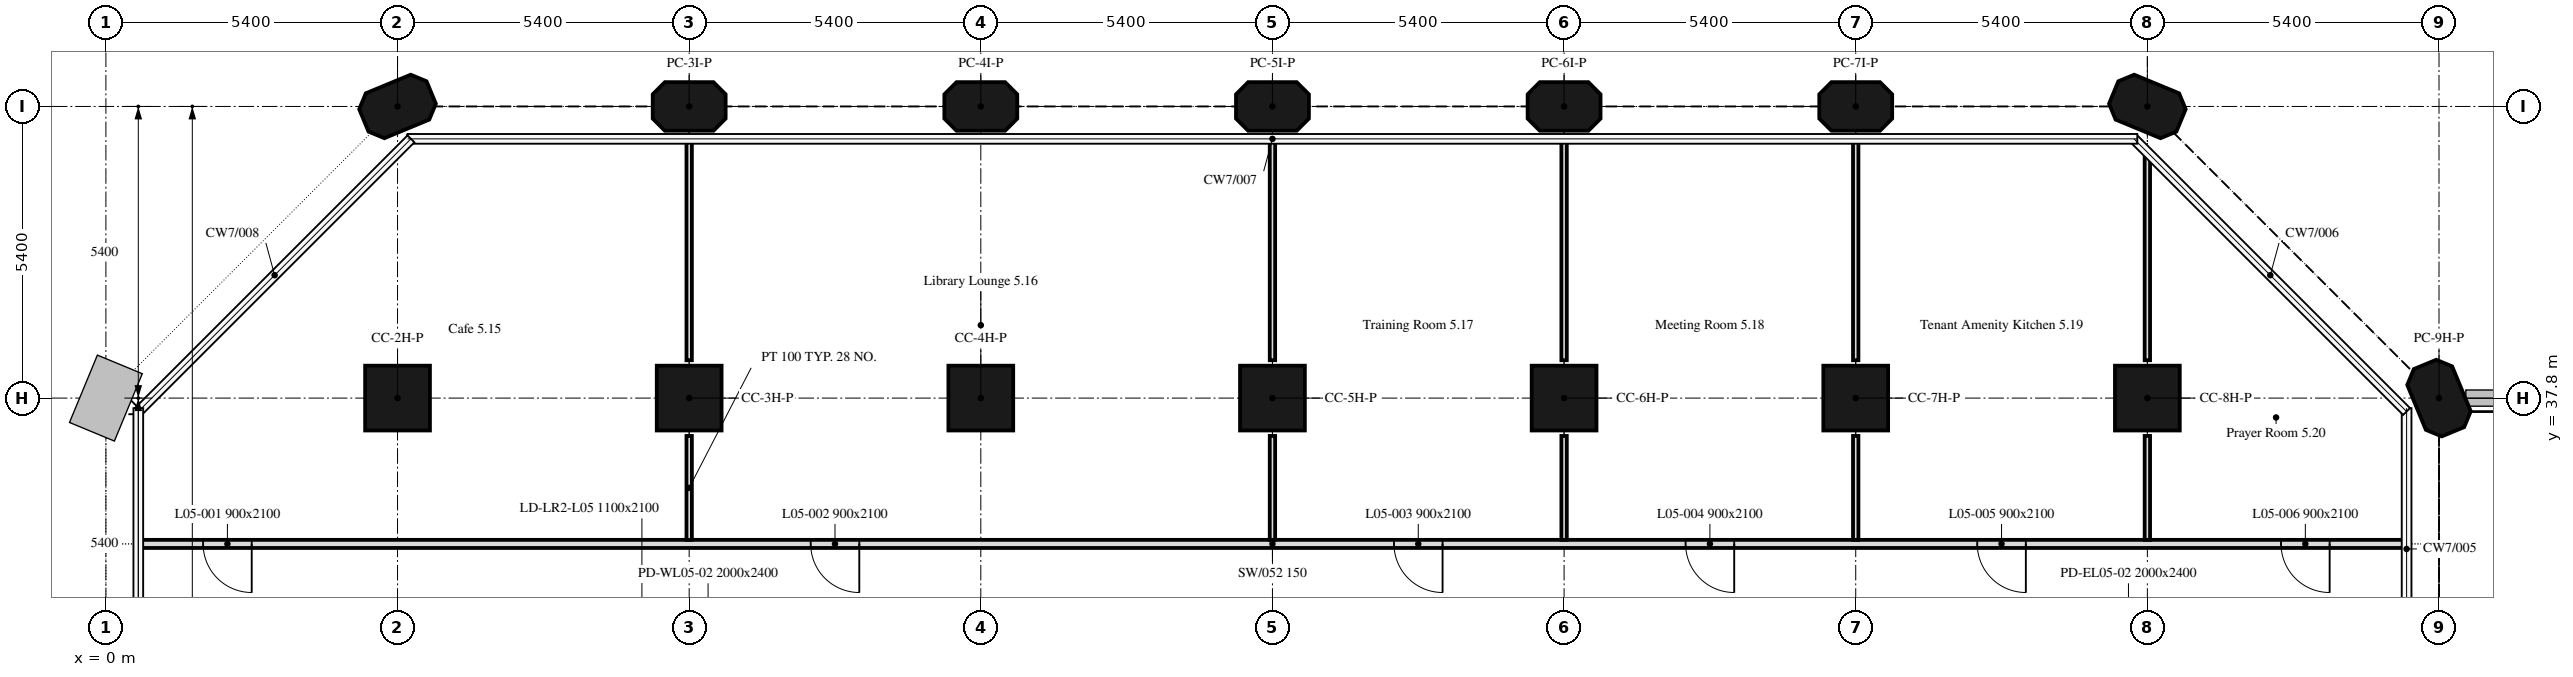
"""IFC4 building model, lengths in metres.
Left out: names, types, materials, properties, quantities, classifications, styles, units other than length and angle.
Written with IfcOpenShell. Run it as: python <this file> out.ifc"""

import sys

from ifc_helpers import new_model, si_unit, direction, frame, frame_2d, origin, origin_2d, place, context, subcontext, project, spatial, polyline, rectangle, outline, extrude, element, fill, save


model = new_model("IFC4")
c1 = context("Model", 3, precision=1e-05, world=origin(), true_north=direction((0.0, 1.0)))
c2 = subcontext(c1, "Body", "Model", "MODEL_VIEW")
j1 = project(units=[si_unit("LENGTHUNIT", "METRE"), si_unit("PLANEANGLEUNIT", "RADIAN")], contexts=[c1])
p1 = place(None, origin())
s1 = spatial("IfcSite", under=j1, at=p1, CompositionType="ELEMENT")
p2 = place(p1, origin())
s2 = spatial("IfcBuilding", under=s1, at=p2, CompositionType="ELEMENT")
p3 = place(p2, frame((0.0, 0.0, 29.1)))
s3 = spatial("IfcBuildingStorey", under=s2, at=p3, CompositionType="ELEMENT", Elevation=29.1)
for number, where, z_axis, x_axis in (
    (1, (5.4, 37.8, 0.0), (0.0, 0.0, 1.0), (1.0, 0.0, 0.0)),
    (2, (10.8, 37.8, 0.0), (0.0, 0.0, 1.0), (1.0, 0.0, 0.0)),
    (3, (16.2, 37.8, 0.0), (0.0, 0.0, 1.0), (1.0, 0.0, 0.0)),
    (4, (21.6, 37.8, 0.0), (0.0, 0.0, 1.0), (1.0, 0.0, 0.0)),
    (5, (27.0, 37.8, 0.0), (0.0, 0.0, 1.0), (1.0, 0.0, 0.0)),
    (6, (32.4, 37.8, 0.0), (0.0, 0.0, 1.0), (1.0, 0.0, 0.0)),
    (7, (37.8, 37.8, 0.0), (0.0, 0.0, 1.0), (1.0, 0.0, 0.0)),
):
    element("IfcColumn", number, at=place(p3, frame(where, z_axis=z_axis, x_axis=x_axis)), inside=s3, PredefinedType="COLUMN", context=c2, shape_type="SweptSolid", body=[
        extrude(rectangle(XDim=1.2, YDim=1.2, at=origin_2d()), origin(), (0.0, 0.0, 1.0), 4.2),
    ])
for number, where, z_axis, x_axis in (
    (8, (43.2, 37.8, 0.0), (0.0, 0.0, 1.0), (-0.383, 0.924, 0.0)),
    (9, (5.4, 43.2, 0.0), (0.0, 0.0, 1.0), (0.924, 0.383, 0.0)),
    (10, (10.8, 43.2, 0.0), (0.0, 0.0, 1.0), (1.0, 0.0, 0.0)),
    (11, (16.2, 43.2, 0.0), (0.0, 0.0, 1.0), (1.0, 0.0, 0.0)),
    (12, (21.6, 43.2, 0.0), (0.0, 0.0, 1.0), (1.0, 0.0, 0.0)),
    (13, (27.0, 43.2, 0.0), (0.0, 0.0, 1.0), (1.0, 0.0, 0.0)),
    (14, (32.4, 43.2, 0.0), (0.0, 0.0, 1.0), (1.0, 0.0, 0.0)),
    (15, (37.8, 43.2, 0.0), (0.0, 0.0, 1.0), (-0.924, 0.383, 0.0)),
):
    element("IfcColumn", number, at=place(p3, frame(where, z_axis=z_axis, x_axis=x_axis)), inside=s3, PredefinedType="COLUMN", context=c2, shape_type="SweptSolid", body=[
        extrude(outline(polyline([(-0.45, -0.45), (0.45, -0.45), (0.675, -0.225), (0.675, 0.225), (0.45, 0.45), (-0.45, 0.45), (-0.675, 0.225), (-0.675, -0.225), (-0.45, -0.45)])), origin(), (0.0, 0.0, 1.0), 4.2),
    ])
p4 = place(p3, frame((42.6, 35.1, 0.0), z_axis=(0.0, 0.0, 1.0), x_axis=(-1.0, 0.0, 0.0)))
e16 = element("IfcWall", 16, at=p4, inside=s3, PredefinedType="PARTITIONING", context=c2, shape_type="SweptSolid", body=[
    extrude(rectangle(XDim=42.0, YDim=0.15, at=frame_2d((21.0, 0.0))), origin(), (0.0, 0.0, 1.0), 4.2),
])
p5 = place(p4, frame((39.9, 0.0, 0.0)))
e17 = element("IfcOpeningElement", 17, at=p5, cuts=e16, PredefinedType="OPENING", context=c2, shape_type="SweptSolid", body=[
    extrude(rectangle(XDim=0.9, YDim=2.1, at=frame_2d((0.45, 1.05))), frame((0.0, 0.075, 0.0), z_axis=(0.0, -1.0, 0.0), x_axis=(1.0, 0.0, 0.0)), (0.0, 0.0, 1.0), 0.15),
])
p6 = place(p4, frame((28.65, 0.0, 0.0)))
e18 = element("IfcOpeningElement", 18, at=p6, cuts=e16, PredefinedType="OPENING", context=c2, shape_type="SweptSolid", body=[
    extrude(rectangle(XDim=0.9, YDim=2.1, at=frame_2d((0.45, 1.05))), frame((0.0, 0.075, 0.0), z_axis=(0.0, -1.0, 0.0), x_axis=(1.0, 0.0, 0.0)), (0.0, 0.0, 1.0), 0.15),
])
p7 = place(p4, frame((17.85, 0.0, 0.0)))
e19 = element("IfcOpeningElement", 19, at=p7, cuts=e16, PredefinedType="OPENING", context=c2, shape_type="SweptSolid", body=[
    extrude(rectangle(XDim=0.9, YDim=2.1, at=frame_2d((0.45, 1.05))), frame((0.0, 0.075, 0.0), z_axis=(0.0, -1.0, 0.0), x_axis=(1.0, 0.0, 0.0)), (0.0, 0.0, 1.0), 0.15),
])
p8 = place(p4, frame((12.45, 0.0, 0.0)))
e20 = element("IfcOpeningElement", 20, at=p8, cuts=e16, PredefinedType="OPENING", context=c2, shape_type="SweptSolid", body=[
    extrude(rectangle(XDim=0.9, YDim=2.1, at=frame_2d((0.45, 1.05))), frame((0.0, 0.075, 0.0), z_axis=(0.0, -1.0, 0.0), x_axis=(1.0, 0.0, 0.0)), (0.0, 0.0, 1.0), 0.15),
])
p9 = place(p4, frame((7.05, 0.0, 0.0)))
e21 = element("IfcOpeningElement", 21, at=p9, cuts=e16, PredefinedType="OPENING", context=c2, shape_type="SweptSolid", body=[
    extrude(rectangle(XDim=0.9, YDim=2.1, at=frame_2d((0.45, 1.05))), frame((0.0, 0.075, 0.0), z_axis=(0.0, -1.0, 0.0), x_axis=(1.0, 0.0, 0.0)), (0.0, 0.0, 1.0), 0.15),
])
p10 = place(p4, frame((1.425, 0.0, 0.0)))
e22 = element("IfcOpeningElement", 22, at=p10, cuts=e16, PredefinedType="OPENING", context=c2, shape_type="SweptSolid", body=[
    extrude(rectangle(XDim=0.9, YDim=2.1, at=frame_2d((0.45, 1.05))), frame((0.0, 0.075, 0.0), z_axis=(0.0, -1.0, 0.0), x_axis=(1.0, 0.0, 0.0)), (0.0, 0.0, 1.0), 0.15),
])
p11 = place(p3, frame((10.8, 35.175, 0.0), z_axis=(0.0, 0.0, 1.0), x_axis=(0.0, 1.0, 0.0)))
e23 = element("IfcWall", 23, at=p11, inside=s3, PredefinedType="PARTITIONING", context=c2, shape_type="SweptSolid", body=[
    extrude(rectangle(XDim=1.924, YDim=0.1, at=frame_2d((0.962, 0.0))), origin(), (0.0, 0.0, 1.0), 4.2),
])
p12 = place(p3, frame((10.8, 38.501, 0.0), z_axis=(0.0, 0.0, 1.0), x_axis=(0.0, 1.0, 0.0)))
e24 = element("IfcWall", 24, at=p12, inside=s3, PredefinedType="PARTITIONING", context=c2, shape_type="SweptSolid", body=[
    extrude(rectangle(XDim=4.099, YDim=0.1, at=frame_2d((2.05, 0.0))), origin(), (0.0, 0.0, 1.0), 4.2),
])
p13 = place(p3, frame((21.6, 35.175, 0.0), z_axis=(0.0, 0.0, 1.0), x_axis=(0.0, 1.0, 0.0)))
e25 = element("IfcWall", 25, at=p13, inside=s3, PredefinedType="PARTITIONING", context=c2, shape_type="SweptSolid", body=[
    extrude(rectangle(XDim=1.924, YDim=0.1, at=frame_2d((0.962, 0.0))), origin(), (0.0, 0.0, 1.0), 4.2),
])
p14 = place(p3, frame((21.6, 38.501, 0.0), z_axis=(0.0, 0.0, 1.0), x_axis=(0.0, 1.0, 0.0)))
e26 = element("IfcWall", 26, at=p14, inside=s3, PredefinedType="PARTITIONING", context=c2, shape_type="SweptSolid", body=[
    extrude(rectangle(XDim=4.099, YDim=0.1, at=frame_2d((2.05, 0.0))), origin(), (0.0, 0.0, 1.0), 4.2),
])
p15 = place(p3, frame((27.0, 35.175, 0.0), z_axis=(0.0, 0.0, 1.0), x_axis=(0.0, 1.0, 0.0)))
e27 = element("IfcWall", 27, at=p15, inside=s3, PredefinedType="PARTITIONING", context=c2, shape_type="SweptSolid", body=[
    extrude(rectangle(XDim=1.924, YDim=0.1, at=frame_2d((0.962, 0.0))), origin(), (0.0, 0.0, 1.0), 4.2),
])
p16 = place(p3, frame((27.0, 38.501, 0.0), z_axis=(0.0, 0.0, 1.0), x_axis=(0.0, 1.0, 0.0)))
e28 = element("IfcWall", 28, at=p16, inside=s3, PredefinedType="PARTITIONING", context=c2, shape_type="SweptSolid", body=[
    extrude(rectangle(XDim=4.099, YDim=0.1, at=frame_2d((2.05, 0.0))), origin(), (0.0, 0.0, 1.0), 4.2),
])
p17 = place(p3, frame((32.4, 35.175, 0.0), z_axis=(0.0, 0.0, 1.0), x_axis=(0.0, 1.0, 0.0)))
e29 = element("IfcWall", 29, at=p17, inside=s3, PredefinedType="PARTITIONING", context=c2, shape_type="SweptSolid", body=[
    extrude(rectangle(XDim=1.924, YDim=0.1, at=frame_2d((0.962, 0.0))), origin(), (0.0, 0.0, 1.0), 4.2),
])
p18 = place(p3, frame((32.4, 38.501, 0.0), z_axis=(0.0, 0.0, 1.0), x_axis=(0.0, 1.0, 0.0)))
e30 = element("IfcWall", 30, at=p18, inside=s3, PredefinedType="PARTITIONING", context=c2, shape_type="SweptSolid", body=[
    extrude(rectangle(XDim=4.099, YDim=0.1, at=frame_2d((2.05, 0.0))), origin(), (0.0, 0.0, 1.0), 4.2),
])
p19 = place(p3, frame((37.8, 35.175, 0.0), z_axis=(0.0, 0.0, 1.0), x_axis=(0.0, 1.0, 0.0)))
e31 = element("IfcWall", 31, at=p19, inside=s3, PredefinedType="PARTITIONING", context=c2, shape_type="SweptSolid", body=[
    extrude(rectangle(XDim=1.924, YDim=0.1, at=frame_2d((0.962, 0.0))), origin(), (0.0, 0.0, 1.0), 4.2),
])
p20 = place(p3, frame((37.8, 38.501, 0.0), z_axis=(0.0, 0.0, 1.0), x_axis=(0.0, 1.0, 0.0)))
e32 = element("IfcWall", 32, at=p20, inside=s3, PredefinedType="PARTITIONING", context=c2, shape_type="SweptSolid", body=[
    extrude(rectangle(XDim=3.801, YDim=0.1, at=frame_2d((1.9, 0.0))), origin(), (0.0, 0.0, 1.0), 4.2),
])
p21 = place(p5, origin())
e33 = element("IfcDoor", 33, at=p21, inside=s3, OperationType="SINGLE_SWING_RIGHT", PredefinedType="DOOR", context=c2, shape_type="SweptSolid", body=[
    extrude(rectangle(XDim=0.9, YDim=2.1, at=frame_2d((0.45, 1.05))), frame((0.0, 0.025, 0.0), z_axis=(0.0, -1.0, 0.0), x_axis=(1.0, 0.0, 0.0)), (0.0, 0.0, 1.0), 0.05),
])
fill(e17, e33)
p22 = place(p6, origin())
e34 = element("IfcDoor", 34, at=p22, inside=s3, OperationType="SINGLE_SWING_RIGHT", PredefinedType="DOOR", context=c2, shape_type="SweptSolid", body=[
    extrude(rectangle(XDim=0.9, YDim=2.1, at=frame_2d((0.45, 1.05))), frame((0.0, 0.025, 0.0), z_axis=(0.0, -1.0, 0.0), x_axis=(1.0, 0.0, 0.0)), (0.0, 0.0, 1.0), 0.05),
])
fill(e18, e34)
p23 = place(p7, origin())
e35 = element("IfcDoor", 35, at=p23, inside=s3, OperationType="SINGLE_SWING_RIGHT", PredefinedType="DOOR", context=c2, shape_type="SweptSolid", body=[
    extrude(rectangle(XDim=0.9, YDim=2.1, at=frame_2d((0.45, 1.05))), frame((0.0, 0.025, 0.0), z_axis=(0.0, -1.0, 0.0), x_axis=(1.0, 0.0, 0.0)), (0.0, 0.0, 1.0), 0.05),
])
fill(e19, e35)
p24 = place(p8, origin())
e36 = element("IfcDoor", 36, at=p24, inside=s3, OperationType="SINGLE_SWING_LEFT", PredefinedType="DOOR", context=c2, shape_type="SweptSolid", body=[
    extrude(rectangle(XDim=0.9, YDim=2.1, at=frame_2d((0.45, 1.05))), frame((0.0, 0.025, 0.0), z_axis=(0.0, -1.0, 0.0), x_axis=(1.0, 0.0, 0.0)), (0.0, 0.0, 1.0), 0.05),
])
fill(e20, e36)
p25 = place(p9, origin())
e37 = element("IfcDoor", 37, at=p25, inside=s3, OperationType="SINGLE_SWING_LEFT", PredefinedType="DOOR", context=c2, shape_type="SweptSolid", body=[
    extrude(rectangle(XDim=0.9, YDim=2.1, at=frame_2d((0.45, 1.05))), frame((0.0, 0.025, 0.0), z_axis=(0.0, -1.0, 0.0), x_axis=(1.0, 0.0, 0.0)), (0.0, 0.0, 1.0), 0.05),
])
fill(e21, e37)
p26 = place(p10, origin())
e38 = element("IfcDoor", 38, at=p26, inside=s3, OperationType="SINGLE_SWING_LEFT", PredefinedType="DOOR", context=c2, shape_type="SweptSolid", body=[
    extrude(rectangle(XDim=0.9, YDim=2.1, at=frame_2d((0.45, 1.05))), frame((0.0, 0.025, 0.0), z_axis=(0.0, -1.0, 0.0), x_axis=(1.0, 0.0, 0.0)), (0.0, 0.0, 1.0), 0.05),
])
fill(e22, e38)
save(model, sys.argv[1])
